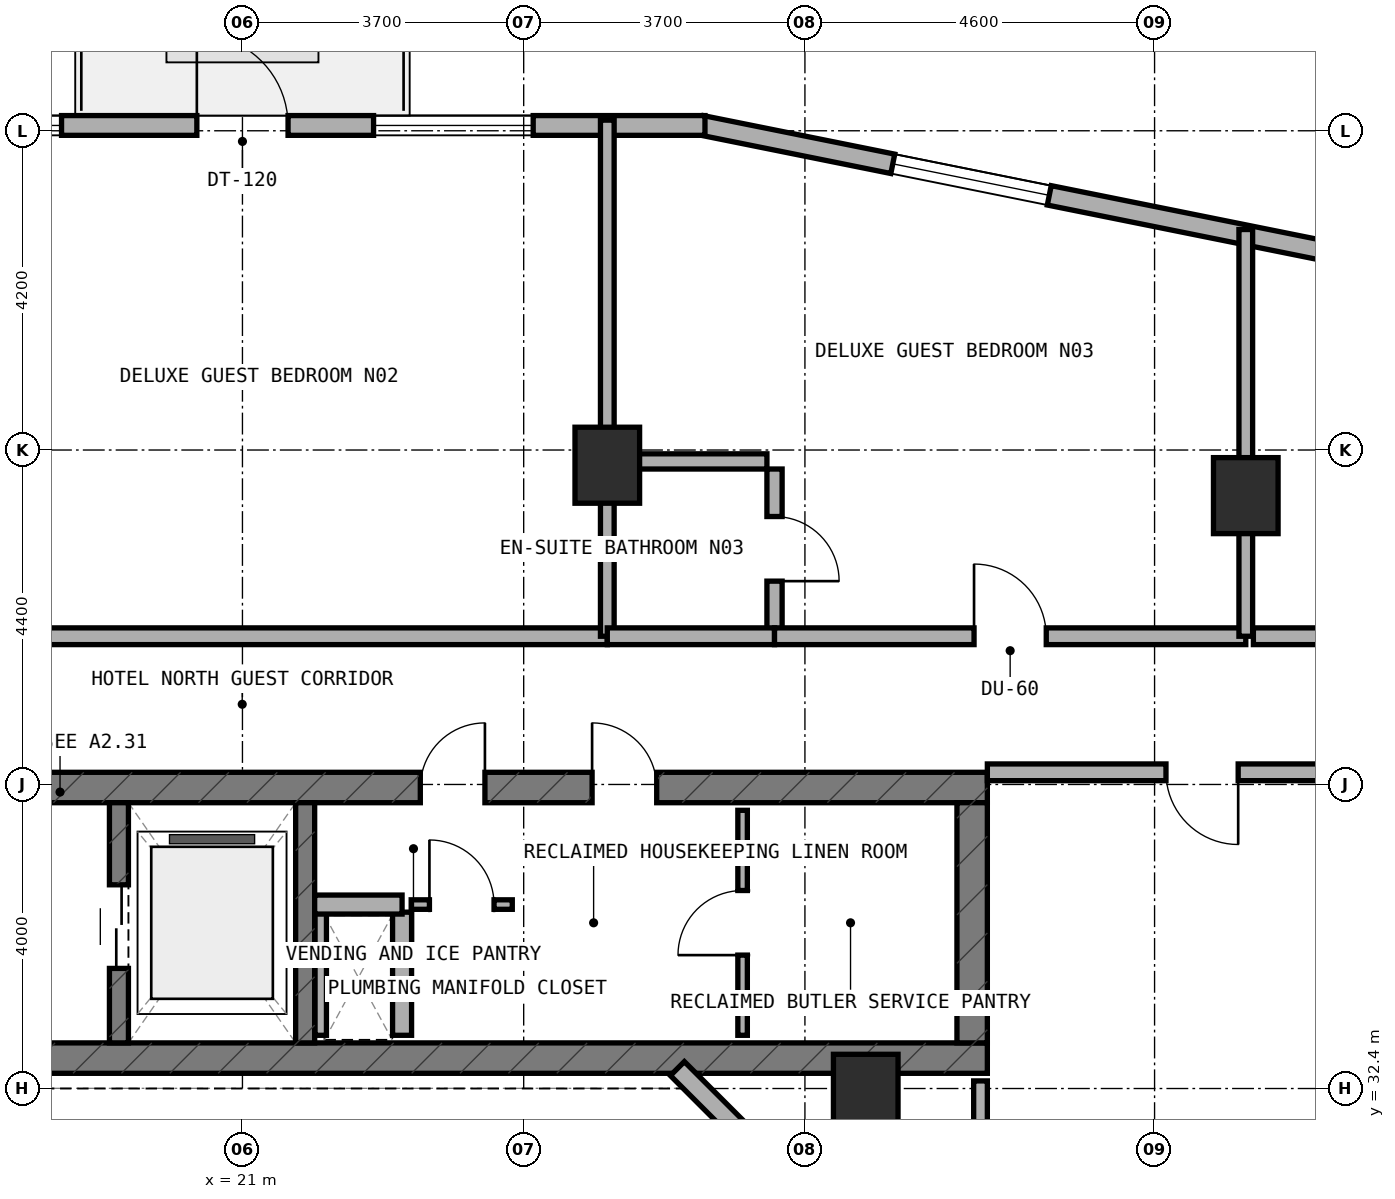
"""IFC4 building model, lengths in metres.
Left out: names, types, materials, properties, quantities, classifications, styles, units other than length and angle.
Written with IfcOpenShell. Run it as: python <this file> out.ifc"""

import sys

from ifc_helpers import new_model, si_unit, direction, frame, frame_2d, origin, origin_2d, place, context, subcontext, project, spatial, rectangle, extrude, element, fill, save


model = new_model("IFC4")
c1 = context("Model", 3, precision=1e-05, world=origin(), true_north=direction((0.0, 1.0)))
c2 = subcontext(c1, "Body", "Model", "MODEL_VIEW")
j1 = project(units=[si_unit("LENGTHUNIT", "METRE"), si_unit("PLANEANGLEUNIT", "RADIAN")], contexts=[c1])
p1 = place(None, origin())
s1 = spatial("IfcSite", under=j1, at=p1, CompositionType="ELEMENT")
p2 = place(p1, origin())
s2 = spatial("IfcBuilding", under=s1, at=p2, CompositionType="ELEMENT")
p3 = place(p2, frame((0.0, 0.0, 134.5)))
s3 = spatial("IfcBuildingStorey", under=s2, at=p3, CompositionType="ELEMENT", Elevation=134.5)
p4 = place(p3, frame((6.4, 32.8, 0.0), z_axis=(0.0, 0.0, 1.0), x_axis=(1.0, 0.0, 0.0)))
e1 = element("IfcWall", 1, at=p4, inside=s3, PredefinedType="SHEAR", context=c2, shape_type="SweptSolid", body=[
    extrude(rectangle(XDim=24.4, YDim=0.4, at=frame_2d((12.2, 0.0))), origin(), (0.0, 0.0, 1.0), 3.5),
])
p5 = place(p4, frame((6.05, 0.0, 0.0)))
e2 = element("IfcOpeningElement", 2, at=p5, cuts=e1, PredefinedType="OPENING", context=c2, shape_type="SweptSolid", body=[
    extrude(rectangle(XDim=1.1, YDim=2.15, at=frame_2d((0.55, 1.075))), frame((0.0, 0.21, 0.0), z_axis=(0.0, -1.0, 0.0), x_axis=(1.0, 0.0, 0.0)), (0.0, 0.0, 1.0), 0.42),
])
p6 = place(p3, frame((6.4, 36.36, 0.0), z_axis=(0.0, 0.0, 1.0), x_axis=(1.0, 0.0, 0.0)))
e3 = element("IfcWall", 3, at=p6, inside=s3, PredefinedType="SHEAR", context=c2, shape_type="SweptSolid", body=[
    extrude(rectangle(XDim=24.4, YDim=0.4, at=frame_2d((12.2, 0.0))), origin(), (0.0, 0.0, 1.0), 3.5),
])
p7 = place(p6, frame((9.15, 0.0, 0.0)))
e4 = element("IfcOpeningElement", 4, at=p7, cuts=e3, PredefinedType="OPENING", context=c2, shape_type="SweptSolid", body=[
    extrude(rectangle(XDim=1.2, YDim=2.15, at=frame_2d((0.6, 1.075))), frame((0.0, 0.21, 0.0), z_axis=(0.0, -1.0, 0.0), x_axis=(1.0, 0.0, 0.0)), (0.0, 0.0, 1.0), 0.42),
])
p8 = place(p6, frame((19.2, 0.0, 0.0)))
e5 = element("IfcOpeningElement", 5, at=p8, cuts=e3, PredefinedType="OPENING", context=c2, shape_type="SweptSolid", body=[
    extrude(rectangle(XDim=0.85, YDim=2.1, at=frame_2d((0.425, 1.05))), frame((0.0, 0.21, 0.0), z_axis=(0.0, -1.0, 0.0), x_axis=(1.0, 0.0, 0.0)), (0.0, 0.0, 1.0), 0.42),
])
p9 = place(p6, frame((16.94, 0.0, 0.0)))
e6 = element("IfcOpeningElement", 6, at=p9, cuts=e3, PredefinedType="OPENING", context=c2, shape_type="SweptSolid", body=[
    extrude(rectangle(XDim=0.85, YDim=2.1, at=frame_2d((0.425, 1.05))), frame((0.0, 0.21, 0.0), z_axis=(0.0, -1.0, 0.0), x_axis=(1.0, 0.0, 0.0)), (0.0, 0.0, 1.0), 0.42),
])
p10 = place(p3, frame((30.6, 33.0, 0.0), z_axis=(0.0, 0.0, 1.0), x_axis=(0.0, 1.0, 0.0)))
e7 = element("IfcWall", 7, at=p10, inside=s3, PredefinedType="SHEAR", context=c2, shape_type="SweptSolid", body=[
    extrude(rectangle(XDim=3.16, YDim=0.4, at=frame_2d((1.58, 0.0))), origin(), (0.0, 0.0, 1.0), 3.5),
])
p11 = place(p3, frame((19.375, 33.0, 0.0), z_axis=(0.0, 0.0, 1.0), x_axis=(0.0, 1.0, 0.0)))
e8 = element("IfcWall", 8, at=p11, inside=s3, PredefinedType="STANDARD", context=c2, shape_type="SweptSolid", body=[
    extrude(rectangle(XDim=3.16, YDim=0.25, at=frame_2d((1.58, 0.0))), origin(), (0.0, 0.0, 1.0), 3.22),
])
p12 = place(p11, frame((0.98, 0.0, 0.0)))
e9 = element("IfcOpeningElement", 9, at=p12, cuts=e8, PredefinedType="OPENING", context=c2, shape_type="SweptSolid", body=[
    extrude(rectangle(XDim=1.1, YDim=2.15, at=frame_2d((0.55, 1.075))), frame((0.0, 0.135, 0.0), z_axis=(0.0, -1.0, 0.0), x_axis=(1.0, 0.0, 0.0)), (0.0, 0.0, 1.0), 0.27),
])
p13 = place(p3, frame((21.825, 33.0, 0.0), z_axis=(0.0, 0.0, 1.0), x_axis=(0.0, 1.0, 0.0)))
e10 = element("IfcWall", 10, at=p13, inside=s3, PredefinedType="STANDARD", context=c2, shape_type="SweptSolid", body=[
    extrude(rectangle(XDim=3.16, YDim=0.25, at=frame_2d((1.58, 0.0))), origin(), (0.0, 0.0, 1.0), 3.22),
])
for number, where, z_axis, x_axis in (
    (11, (25.8, 40.6, 0.0), (0.0, 0.0, 1.0), (1.0, 0.0, 0.0)),
    (12, (34.2, 40.2, 0.0), (0.0, 0.0, 1.0), (1.0, 0.0, 0.0)),
    (13, (29.2, 32.35, 0.0), (0.0, 0.0, 1.0), (1.0, 0.0, 0.0)),
):
    element("IfcColumn", number, at=place(p3, frame(where, z_axis=z_axis, x_axis=x_axis)), inside=s3, PredefinedType="COLUMN", context=c2, shape_type="SweptSolid", body=[
        extrude(rectangle(XDim=0.85, YDim=1.0, at=origin_2d()), origin(), (0.0, 0.0, 1.0), 3.5),
    ])
p14 = place(p3, frame((35.982, 43.271, 0.0), z_axis=(0.0, 0.0, 1.0), x_axis=(-0.980317172899, 0.197429077186, 0.0)))
e14 = element("IfcWall", 14, at=p14, inside=s3, PredefinedType="STANDARD", context=c2, shape_type="SweptSolid", body=[
    extrude(rectangle(XDim=9.117, YDim=0.26, at=frame_2d((4.559, 0.0))), origin(), (0.0, 0.0, 1.0), 3.22),
])
p15 = place(p14, frame((4.455, 0.0, 0.85)))
e15 = element("IfcOpeningElement", 15, at=p15, cuts=e14, PredefinedType="OPENING", context=c2, shape_type="SweptSolid", body=[
    extrude(rectangle(XDim=2.1, YDim=1.5, at=frame_2d((1.05, 0.75))), frame((0.0, 0.14, 0.0), z_axis=(0.0, -1.0, 0.0), x_axis=(1.0, 0.0, 0.0)), (0.0, 0.0, 1.0), 0.28),
])
p16 = place(p3, frame((27.085, 45.07, 0.0), z_axis=(0.0, 0.0, 1.0), x_axis=(-1.0, 0.0, 0.0)))
e16 = element("IfcWall", 16, at=p16, inside=s3, PredefinedType="STANDARD", context=c2, shape_type="SweptSolid", body=[
    extrude(rectangle(XDim=12.135, YDim=0.26, at=frame_2d((6.067, 0.0))), origin(), (0.0, 0.0, 1.0), 3.22),
])
p17 = place(p16, frame((5.485, 0.0, 0.0)))
e17 = element("IfcOpeningElement", 17, at=p17, cuts=e16, PredefinedType="OPENING", context=c2, shape_type="SweptSolid", body=[
    extrude(rectangle(XDim=1.2, YDim=2.15, at=frame_2d((0.6, 1.075))), frame((0.0, 0.14, 0.0), z_axis=(0.0, -1.0, 0.0), x_axis=(1.0, 0.0, 0.0)), (0.0, 0.0, 1.0), 0.28),
])
p18 = place(p16, frame((2.26, 0.0, 0.85)))
e18 = element("IfcOpeningElement", 18, at=p18, cuts=e16, PredefinedType="OPENING", context=c2, shape_type="SweptSolid", body=[
    extrude(rectangle(XDim=2.1, YDim=1.5, at=frame_2d((1.05, 0.75))), frame((0.0, 0.14, 0.0), z_axis=(0.0, -1.0, 0.0), x_axis=(1.0, 0.0, 0.0)), (0.0, 0.0, 1.0), 0.28),
])
p19 = place(p16, frame((8.465, 0.0, 0.85)))
e19 = element("IfcOpeningElement", 19, at=p19, cuts=e16, PredefinedType="OPENING", context=c2, shape_type="SweptSolid", body=[
    extrude(rectangle(XDim=2.1, YDim=1.5, at=frame_2d((1.05, 0.75))), frame((0.0, 0.14, 0.0), z_axis=(0.0, -1.0, 0.0), x_axis=(1.0, 0.0, 0.0)), (0.0, 0.0, 1.0), 0.28),
])
p20 = place(p3, frame((28.556, 30.828, 0.0), z_axis=(0.0, 0.0, 1.0), x_axis=(-0.707059717605, 0.707153841636, 0.0)))
e20 = element("IfcWall", 20, at=p20, inside=s3, PredefinedType="STANDARD", context=c2, shape_type="SweptSolid", body=[
    extrude(rectangle(XDim=2.594, YDim=0.26, at=frame_2d((1.297, 0.0))), origin(), (0.0, 0.0, 1.0), 3.22),
])
p21 = place(p3, frame((27.58, 33.1, 0.0), z_axis=(0.0, 0.0, 1.0), x_axis=(0.0, 1.0, 0.0)))
e21 = element("IfcWall", 21, at=p21, inside=s3, PredefinedType="PARTITIONING", context=c2, shape_type="SweptSolid", body=[
    extrude(rectangle(XDim=2.96, YDim=0.125, at=frame_2d((1.48, 0.0))), origin(), (0.0, 0.0, 1.0), 2.695),
])
p22 = place(p21, frame((1.055, 0.0, 0.0)))
e22 = element("IfcOpeningElement", 22, at=p22, cuts=e21, PredefinedType="OPENING", context=c2, shape_type="SweptSolid", body=[
    extrude(rectangle(XDim=0.85, YDim=2.1, at=frame_2d((0.425, 1.05))), frame((0.0, 0.073, 0.0), z_axis=(0.0, -1.0, 0.0), x_axis=(1.0, 0.0, 0.0)), (0.0, 0.0, 1.0), 0.145),
])
p23 = place(p3, frame((22.03, 33.1, 0.0), z_axis=(0.0, 0.0, 1.0), x_axis=(0.0, 1.0, 0.0)))
e23 = element("IfcWall", 23, at=p23, inside=s3, PredefinedType="PARTITIONING", context=c2, shape_type="SweptSolid", body=[
    extrude(rectangle(XDim=1.62, YDim=0.15, at=frame_2d((0.81, 0.0))), origin(), (0.0, 0.0, 1.0), 3.22),
])
p24 = place(p3, frame((23.1, 33.1, 0.0), z_axis=(0.0, 0.0, 1.0), x_axis=(0.0, 1.0, 0.0)))
e24 = element("IfcWall", 24, at=p24, inside=s3, PredefinedType="SOLIDWALL", context=c2, shape_type="SweptSolid", body=[
    extrude(rectangle(XDim=1.62, YDim=0.25, at=frame_2d((0.81, 0.0))), origin(), (0.0, 0.0, 1.0), 3.22),
])
p25 = place(p3, frame((21.95, 34.82, 0.0), z_axis=(0.0, 0.0, 1.0), x_axis=(1.0, 0.0, 0.0)))
e25 = element("IfcWall", 25, at=p25, inside=s3, PredefinedType="SOLIDWALL", context=c2, shape_type="SweptSolid", body=[
    extrude(rectangle(XDim=1.15, YDim=0.25, at=frame_2d((0.575, 0.0))), origin(), (0.0, 0.0, 1.0), 3.22),
])
p26 = place(p3, frame((23.22, 34.82, 0.0), z_axis=(0.0, 0.0, 1.0), x_axis=(1.0, 0.0, 0.0)))
e26 = element("IfcWall", 26, at=p26, inside=s3, PredefinedType="PARTITIONING", context=c2, shape_type="SweptSolid", body=[
    extrude(rectangle(XDim=1.33, YDim=0.125, at=frame_2d((0.665, 0.0))), origin(), (0.0, 0.0, 1.0), 3.22),
])
p27 = place(p26, frame((0.24, 0.0, 0.0)))
e27 = element("IfcOpeningElement", 27, at=p27, cuts=e26, PredefinedType="OPENING", context=c2, shape_type="SweptSolid", body=[
    extrude(rectangle(XDim=0.85, YDim=2.1, at=frame_2d((0.425, 1.05))), frame((0.0, 0.073, 0.0), z_axis=(0.0, -1.0, 0.0), x_axis=(1.0, 0.0, 0.0)), (0.0, 0.0, 1.0), 0.145),
])
p28 = place(p3, frame((10.0, 38.35, 0.0), z_axis=(0.0, 0.0, 1.0), x_axis=(1.0, 0.0, 0.0)))
e28 = element("IfcWall", 28, at=p28, inside=s3, PredefinedType="SOLIDWALL", context=c2, shape_type="SweptSolid", body=[
    extrude(rectangle(XDim=15.8, YDim=0.22, at=frame_2d((7.9, 0.0))), origin(), (0.0, 0.0, 1.0), 2.695),
])
p29 = place(p28, frame((7.425, 0.0, 0.0)))
e29 = element("IfcOpeningElement", 29, at=p29, cuts=e28, PredefinedType="OPENING", context=c2, shape_type="SweptSolid", body=[
    extrude(rectangle(XDim=0.95, YDim=2.1, at=frame_2d((0.475, 1.05))), frame((0.0, 0.12, 0.0), z_axis=(0.0, -1.0, 0.0), x_axis=(1.0, 0.0, 0.0)), (0.0, 0.0, 1.0), 0.24),
])
p30 = place(p3, frame((25.8, 38.35, 0.0), z_axis=(0.0, 0.0, 1.0), x_axis=(0.0, 1.0, 0.0)))
e30 = element("IfcWall", 30, at=p30, inside=s3, PredefinedType="SOLIDWALL", context=c2, shape_type="SweptSolid", body=[
    extrude(rectangle(XDim=6.79, YDim=0.18, at=frame_2d((3.395, 0.0))), origin(), (0.0, 0.0, 1.0), 2.695),
])
p31 = place(p3, frame((28.0, 38.45, 0.0), z_axis=(0.0, 0.0, 1.0), x_axis=(0.0, 1.0, 0.0)))
e31 = element("IfcWall", 31, at=p31, inside=s3, PredefinedType="PLUMBINGWALL", context=c2, shape_type="SweptSolid", body=[
    extrude(rectangle(XDim=2.1, YDim=0.2, at=frame_2d((1.05, 0.0))), origin(), (0.0, 0.0, 1.0), 2.835),
])
p32 = place(p31, frame((0.625, 0.0, 0.0)))
e32 = element("IfcOpeningElement", 32, at=p32, cuts=e31, PredefinedType="OPENING", context=c2, shape_type="SweptSolid", body=[
    extrude(rectangle(XDim=0.85, YDim=2.1, at=frame_2d((0.425, 1.05))), frame((0.0, 0.11, 0.0), z_axis=(0.0, -1.0, 0.0), x_axis=(1.0, 0.0, 0.0)), (0.0, 0.0, 1.0), 0.22),
])
p33 = place(p3, frame((25.9, 40.65, 0.0), z_axis=(0.0, 0.0, 1.0), x_axis=(1.0, 0.0, 0.0)))
e33 = element("IfcWall", 33, at=p33, inside=s3, PredefinedType="PLUMBINGWALL", context=c2, shape_type="SweptSolid", body=[
    extrude(rectangle(XDim=2.0, YDim=0.2, at=frame_2d((1.0, 0.0))), origin(), (0.0, 0.0, 1.0), 2.835),
])
p34 = place(p3, frame((25.8, 38.35, 0.0), z_axis=(0.0, 0.0, 1.0), x_axis=(1.0, 0.0, 0.0)))
e34 = element("IfcWall", 34, at=p34, inside=s3, PredefinedType="SOLIDWALL", context=c2, shape_type="SweptSolid", body=[
    extrude(rectangle(XDim=2.2, YDim=0.22, at=frame_2d((1.1, 0.0))), origin(), (0.0, 0.0, 1.0), 2.695),
])
p35 = place(p3, frame((28.0, 38.35, 0.0), z_axis=(0.0, 0.0, 1.0), x_axis=(1.0, 0.0, 0.0)))
e35 = element("IfcWall", 35, at=p35, inside=s3, PredefinedType="SOLIDWALL", context=c2, shape_type="SweptSolid", body=[
    extrude(rectangle(XDim=6.2, YDim=0.22, at=frame_2d((3.1, 0.0))), origin(), (0.0, 0.0, 1.0), 2.695),
])
p36 = place(p35, frame((2.625, 0.0, 0.0)))
e36 = element("IfcOpeningElement", 36, at=p36, cuts=e35, PredefinedType="OPENING", context=c2, shape_type="SweptSolid", body=[
    extrude(rectangle(XDim=0.95, YDim=2.1, at=frame_2d((0.475, 1.05))), frame((0.0, 0.12, 0.0), z_axis=(0.0, -1.0, 0.0), x_axis=(1.0, 0.0, 0.0)), (0.0, 0.0, 1.0), 0.24),
])
p37 = place(p3, frame((34.2, 38.35, 0.0), z_axis=(0.0, 0.0, 1.0), x_axis=(0.0, 1.0, 0.0)))
e37 = element("IfcWall", 37, at=p37, inside=s3, PredefinedType="SOLIDWALL", context=c2, shape_type="SweptSolid", body=[
    extrude(rectangle(XDim=5.351, YDim=0.18, at=frame_2d((2.675, 0.0))), origin(), (0.0, 0.0, 1.0), 2.695),
])
p38 = place(p3, frame((34.3, 38.35, 0.0), z_axis=(0.0, 0.0, 1.0), x_axis=(1.0, 0.0, 0.0)))
e38 = element("IfcWall", 38, at=p38, inside=s3, PredefinedType="SOLIDWALL", context=c2, shape_type="SweptSolid", body=[
    extrude(rectangle(XDim=6.64, YDim=0.22, at=frame_2d((3.32, 0.0))), origin(), (0.0, 0.0, 1.0), 2.835),
])
p39 = place(p38, frame((2.55, 0.0, 0.0)))
e39 = element("IfcOpeningElement", 39, at=p39, cuts=e38, PredefinedType="OPENING", context=c2, shape_type="SweptSolid", body=[
    extrude(rectangle(XDim=0.95, YDim=2.1, at=frame_2d((0.475, 1.05))), frame((0.0, 0.12, 0.0), z_axis=(0.0, -1.0, 0.0), x_axis=(1.0, 0.0, 0.0)), (0.0, 0.0, 1.0), 0.24),
])
p40 = place(p3, frame((30.71, 17.5, 0.0), z_axis=(0.0, 0.0, 1.0), x_axis=(0.0, 1.0, 0.0)))
e40 = element("IfcWall", 40, at=p40, inside=s3, PredefinedType="SOLIDWALL", context=c2, shape_type="SweptSolid", body=[
    extrude(rectangle(XDim=15.0, YDim=0.18, at=frame_2d((7.5, 0.0))), origin(), (0.0, 0.0, 1.0), 2.695),
])
p41 = place(p3, frame((30.8, 36.56, 0.0), z_axis=(0.0, 0.0, 1.0), x_axis=(1.0, 0.0, 0.0)))
e41 = element("IfcWall", 41, at=p41, inside=s3, PredefinedType="SOLIDWALL", context=c2, shape_type="SweptSolid", body=[
    extrude(rectangle(XDim=5.65, YDim=0.22, at=frame_2d((2.825, 0.0))), origin(), (0.0, 0.0, 1.0), 2.695),
])
p42 = place(p41, frame((2.35, 0.0, 0.0)))
e42 = element("IfcOpeningElement", 42, at=p42, cuts=e41, PredefinedType="OPENING", context=c2, shape_type="SweptSolid", body=[
    extrude(rectangle(XDim=0.95, YDim=2.1, at=frame_2d((0.475, 1.05))), frame((0.0, 0.12, 0.0), z_axis=(0.0, -1.0, 0.0), x_axis=(1.0, 0.0, 0.0)), (0.0, 0.0, 1.0), 0.24),
])
p43 = place(p15, origin())
e43 = element("IfcWindow", 43, at=p43, inside=s3, PartitioningType="SINGLE_PANEL", PredefinedType="WINDOW", context=c2, shape_type="SweptSolid", body=[
    extrude(rectangle(XDim=2.1, YDim=1.5, at=frame_2d((1.05, 0.75))), frame((0.0, 0.03, 0.0), z_axis=(0.0, -1.0, 0.0), x_axis=(1.0, 0.0, 0.0)), (0.0, 0.0, 1.0), 0.06),
])
fill(e15, e43)
p44 = place(p17, frame((1.2, 0.0, 0.0), z_axis=(0.0, 0.0, 1.0), x_axis=(-1.0, 0.0, 0.0)))
e44 = element("IfcDoor", 44, at=p44, inside=s3, OperationType="SINGLE_SWING_LEFT", PredefinedType="DOOR", context=c2, shape_type="SweptSolid", body=[
    extrude(rectangle(XDim=1.2, YDim=2.15, at=frame_2d((0.6, 1.075))), frame((0.0, 0.025, 0.0), z_axis=(0.0, -1.0, 0.0), x_axis=(1.0, 0.0, 0.0)), (0.0, 0.0, 1.0), 0.05),
])
fill(e17, e44)
p45 = place(p18, origin())
e45 = element("IfcWindow", 45, at=p45, inside=s3, PartitioningType="SINGLE_PANEL", PredefinedType="WINDOW", context=c2, shape_type="SweptSolid", body=[
    extrude(rectangle(XDim=2.1, YDim=1.5, at=frame_2d((1.05, 0.75))), frame((0.0, 0.03, 0.0), z_axis=(0.0, -1.0, 0.0), x_axis=(1.0, 0.0, 0.0)), (0.0, 0.0, 1.0), 0.06),
])
fill(e18, e45)
p46 = place(p19, origin())
e46 = element("IfcWindow", 46, at=p46, inside=s3, PartitioningType="SINGLE_PANEL", PredefinedType="WINDOW", context=c2, shape_type="SweptSolid", body=[
    extrude(rectangle(XDim=2.1, YDim=1.5, at=frame_2d((1.05, 0.75))), frame((0.0, 0.03, 0.0), z_axis=(0.0, -1.0, 0.0), x_axis=(1.0, 0.0, 0.0)), (0.0, 0.0, 1.0), 0.06),
])
fill(e19, e46)
p47 = place(p12, origin())
e47 = element("IfcDoor", 47, at=p47, inside=s3, OperationType="DOUBLE_DOOR_SLIDING", PredefinedType="DOOR", context=c2, shape_type="SweptSolid", body=[
    extrude(rectangle(XDim=1.1, YDim=2.15, at=frame_2d((0.55, 1.075))), frame((0.0, 0.025, 0.0), z_axis=(0.0, -1.0, 0.0), x_axis=(1.0, 0.0, 0.0)), (0.0, 0.0, 1.0), 0.05),
])
fill(e9, e47)
p48 = place(p8, origin())
e48 = element("IfcDoor", 48, at=p48, inside=s3, OperationType="SINGLE_SWING_LEFT", PredefinedType="DOOR", context=c2, shape_type="SweptSolid", body=[
    extrude(rectangle(XDim=0.85, YDim=2.1, at=frame_2d((0.425, 1.05))), frame((0.0, 0.025, 0.0), z_axis=(0.0, -1.0, 0.0), x_axis=(1.0, 0.0, 0.0)), (0.0, 0.0, 1.0), 0.05),
])
fill(e5, e48)
p49 = place(p9, origin())
e49 = element("IfcDoor", 49, at=p49, inside=s3, OperationType="SINGLE_SWING_RIGHT", PredefinedType="DOOR", context=c2, shape_type="SweptSolid", body=[
    extrude(rectangle(XDim=0.85, YDim=2.1, at=frame_2d((0.425, 1.05))), frame((0.0, 0.025, 0.0), z_axis=(0.0, -1.0, 0.0), x_axis=(1.0, 0.0, 0.0)), (0.0, 0.0, 1.0), 0.05),
])
fill(e6, e49)
p50 = place(p22, origin())
e50 = element("IfcDoor", 50, at=p50, inside=s3, OperationType="SINGLE_SWING_LEFT", PredefinedType="DOOR", context=c2, shape_type="SweptSolid", body=[
    extrude(rectangle(XDim=0.85, YDim=2.1, at=frame_2d((0.425, 1.05))), frame((0.0, 0.025, 0.0), z_axis=(0.0, -1.0, 0.0), x_axis=(1.0, 0.0, 0.0)), (0.0, 0.0, 1.0), 0.05),
])
fill(e22, e50)
p51 = place(p27, origin())
e51 = element("IfcDoor", 51, at=p51, inside=s3, OperationType="SINGLE_SWING_LEFT", PredefinedType="DOOR", context=c2, shape_type="SweptSolid", body=[
    extrude(rectangle(XDim=0.85, YDim=2.1, at=frame_2d((0.425, 1.05))), frame((0.0, 0.025, 0.0), z_axis=(0.0, -1.0, 0.0), x_axis=(1.0, 0.0, 0.0)), (0.0, 0.0, 1.0), 0.05),
])
fill(e27, e51)
p52 = place(p32, frame((0.85, 0.0, 0.0), z_axis=(0.0, 0.0, 1.0), x_axis=(-1.0, 0.0, 0.0)))
e52 = element("IfcDoor", 52, at=p52, inside=s3, OperationType="SINGLE_SWING_RIGHT", PredefinedType="DOOR", context=c2, shape_type="SweptSolid", body=[
    extrude(rectangle(XDim=0.85, YDim=2.1, at=frame_2d((0.425, 1.05))), frame((0.0, 0.025, 0.0), z_axis=(0.0, -1.0, 0.0), x_axis=(1.0, 0.0, 0.0)), (0.0, 0.0, 1.0), 0.05),
])
fill(e32, e52)
p53 = place(p36, origin())
e53 = element("IfcDoor", 53, at=p53, inside=s3, OperationType="SINGLE_SWING_LEFT", PredefinedType="DOOR", context=c2, shape_type="SweptSolid", body=[
    extrude(rectangle(XDim=0.95, YDim=2.1, at=frame_2d((0.475, 1.05))), frame((0.0, 0.025, 0.0), z_axis=(0.0, -1.0, 0.0), x_axis=(1.0, 0.0, 0.0)), (0.0, 0.0, 1.0), 0.05),
])
fill(e36, e53)
p54 = place(p42, frame((0.95, 0.0, 0.0), z_axis=(0.0, 0.0, 1.0), x_axis=(-1.0, 0.0, 0.0)))
e54 = element("IfcDoor", 54, at=p54, inside=s3, OperationType="SINGLE_SWING_LEFT", PredefinedType="DOOR", context=c2, shape_type="SweptSolid", body=[
    extrude(rectangle(XDim=0.95, YDim=2.1, at=frame_2d((0.475, 1.05))), frame((0.0, 0.025, 0.0), z_axis=(0.0, -1.0, 0.0), x_axis=(1.0, 0.0, 0.0)), (0.0, 0.0, 1.0), 0.05),
])
fill(e42, e54)
save(model, sys.argv[1])
